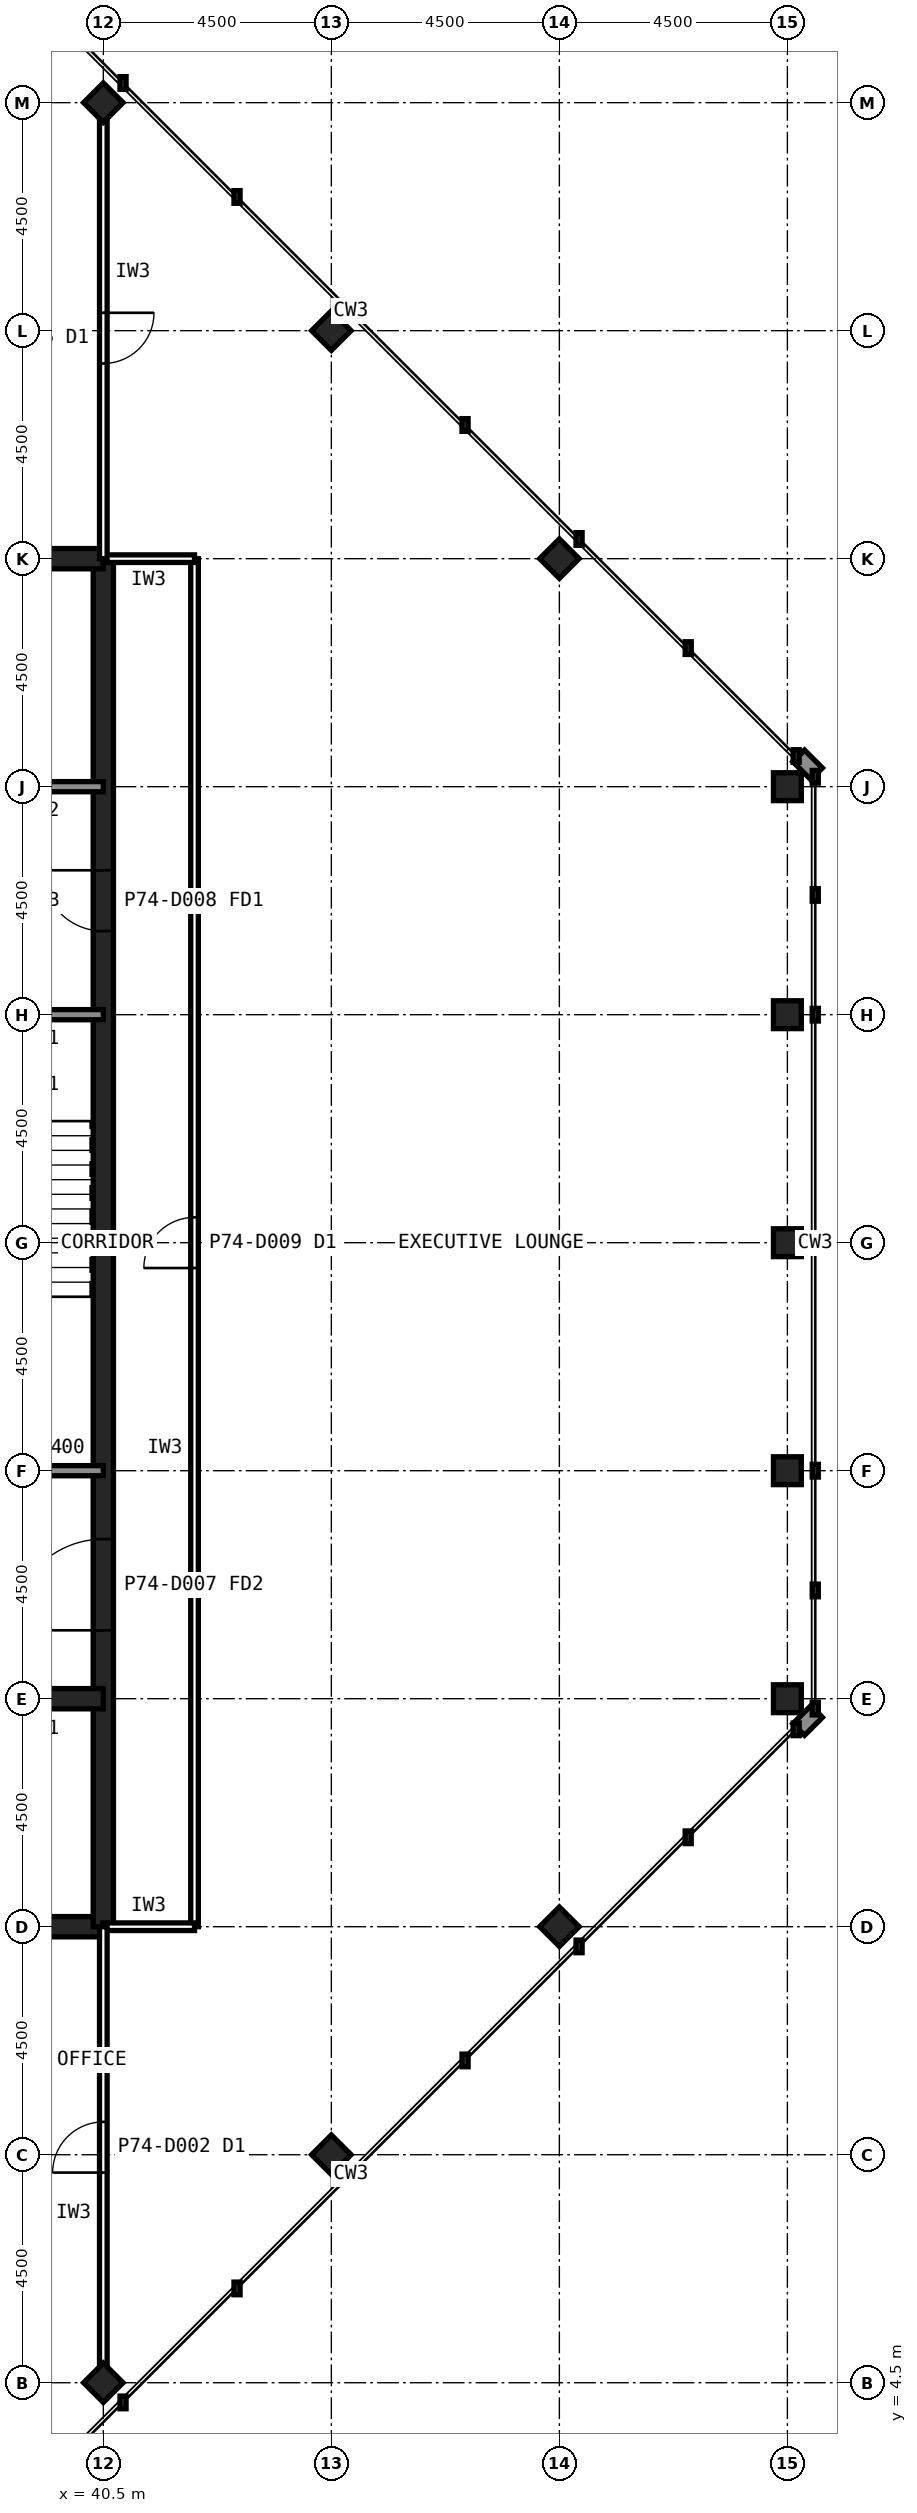
"""IFC4 building model, lengths in metres.
Left out: names, types, materials, properties, quantities, classifications, styles, units other than length and angle.
Written with IfcOpenShell. Run it as: python <this file> out.ifc"""

import sys

from ifc_helpers import new_model, si_unit, direction, frame, frame_2d, origin, origin_2d, place, context, subcontext, project, spatial, rectangle, hollow_rectangle, extrude, element, fill, save


model = new_model("IFC4")
c1 = context("Model", 3, precision=1e-05, world=origin(), true_north=direction((0.0, 1.0)))
c2 = subcontext(c1, "Body", "Model", "MODEL_VIEW")
j1 = project(units=[si_unit("LENGTHUNIT", "METRE"), si_unit("PLANEANGLEUNIT", "RADIAN")], contexts=[c1])
p1 = place(None, origin())
s1 = spatial("IfcSite", under=j1, at=p1, CompositionType="ELEMENT")
p2 = place(p1, origin())
s2 = spatial("IfcBuilding", under=s1, at=p2, CompositionType="ELEMENT")
p3 = place(p2, frame((0.0, 0.0, 310.6)))
s3 = spatial("IfcBuildingStorey", under=s2, at=p3, CompositionType="ELEMENT", Elevation=310.6)
for number, where, z_axis, x_axis in (
    (1, (54.0, 18.0, 0.0), (0.0, 0.0, 1.0), (1.0, 0.0, 0.0)),
    (2, (54.0, 22.5, 0.0), (0.0, 0.0, 1.0), (1.0, 0.0, 0.0)),
    (3, (54.0, 27.0, 0.0), (0.0, 0.0, 1.0), (1.0, 0.0, 0.0)),
    (4, (54.0, 31.5, 0.0), (0.0, 0.0, 1.0), (1.0, 0.0, 0.0)),
    (5, (54.0, 36.0, 0.0), (0.0, 0.0, 1.0), (1.0, 0.0, 0.0)),
    (6, (40.5, 4.5, 0.0), (0.0, 0.0, 1.0), (0.707, 0.707, 0.0)),
    (7, (45.0, 9.0, 0.0), (0.0, 0.0, 1.0), (0.707, 0.707, 0.0)),
    (8, (49.5, 13.5, 0.0), (0.0, 0.0, 1.0), (0.707, 0.707, 0.0)),
    (9, (49.5, 40.5, 0.0), (0.0, 0.0, 1.0), (0.707, 0.707, 0.0)),
    (10, (45.0, 45.0, 0.0), (0.0, 0.0, 1.0), (0.707, 0.707, 0.0)),
    (11, (40.5, 49.5, 0.0), (0.0, 0.0, 1.0), (0.707, 0.707, 0.0)),
):
    element("IfcColumn", number, at=place(p3, frame(where, z_axis=z_axis, x_axis=x_axis)), inside=s3, PredefinedType="COLUMN", context=c2, shape_type="SweptSolid", body=[
        extrude(hollow_rectangle(XDim=0.55, YDim=0.55, WallThickness=0.025, at=origin_2d()), origin(), (0.0, 0.0, 1.0), 4.5),
    ])
p4 = place(p3, frame((13.5, 13.5, 0.0), z_axis=(0.0, 0.0, 1.0), x_axis=(1.0, 0.0, 0.0)))
e12 = element("IfcWall", 12, at=p4, inside=s3, PredefinedType="SHEAR", context=c2, shape_type="SweptSolid", body=[
    extrude(rectangle(XDim=27.0, YDim=0.4, at=frame_2d((13.5, 0.0))), origin(), (0.0, 0.0, 1.0), 4.5),
])
p5 = place(p3, frame((40.5, 13.5, 0.0), z_axis=(0.0, 0.0, 1.0), x_axis=(0.0, 1.0, 0.0)))
e13 = element("IfcWall", 13, at=p5, inside=s3, PredefinedType="SHEAR", context=c2, shape_type="SweptSolid", body=[
    extrude(rectangle(XDim=27.0, YDim=0.4, at=frame_2d((13.5, 0.0))), origin(), (0.0, 0.0, 1.0), 4.5),
])
p6 = place(p5, frame((5.85, 0.0, 0.0)))
e14 = element("IfcOpeningElement", 14, at=p6, cuts=e13, PredefinedType="OPENING", context=c2, shape_type="SweptSolid", body=[
    extrude(rectangle(XDim=1.8, YDim=2.1, at=frame_2d((0.9, 1.05))), frame((0.0, 0.21, 0.0), z_axis=(0.0, -1.0, 0.0), x_axis=(1.0, 0.0, 0.0)), (0.0, 0.0, 1.0), 0.42),
])
p7 = place(p5, frame((19.65, 0.0, 0.0)))
e15 = element("IfcOpeningElement", 15, at=p7, cuts=e13, PredefinedType="OPENING", context=c2, shape_type="SweptSolid", body=[
    extrude(rectangle(XDim=1.2, YDim=2.1, at=frame_2d((0.6, 1.05))), frame((0.0, 0.21, 0.0), z_axis=(0.0, -1.0, 0.0), x_axis=(1.0, 0.0, 0.0)), (0.0, 0.0, 1.0), 0.42),
])
p8 = place(p3, frame((40.5, 40.5, 0.0), z_axis=(0.0, 0.0, 1.0), x_axis=(-1.0, 0.0, 0.0)))
e16 = element("IfcWall", 16, at=p8, inside=s3, PredefinedType="SHEAR", context=c2, shape_type="SweptSolid", body=[
    extrude(rectangle(XDim=27.0, YDim=0.4, at=frame_2d((13.5, 0.0))), origin(), (0.0, 0.0, 1.0), 4.5),
])
p9 = place(p3, frame((13.5, 18.0, 0.0), z_axis=(0.0, 0.0, 1.0), x_axis=(1.0, 0.0, 0.0)))
e17 = element("IfcWall", 17, at=p9, inside=s3, PredefinedType="SHEAR", context=c2, shape_type="SweptSolid", body=[
    extrude(rectangle(XDim=27.0, YDim=0.4, at=frame_2d((13.5, 0.0))), origin(), (0.0, 0.0, 1.0), 4.5),
])
p10 = place(p9, frame((24.3, 0.0, 0.0)))
e18 = element("IfcOpeningElement", 18, at=p10, cuts=e17, PredefinedType="OPENING", context=c2, shape_type="SweptSolid", body=[
    extrude(rectangle(XDim=0.9, YDim=2.1, at=frame_2d((0.45, 1.05))), frame((0.0, 0.21, 0.0), z_axis=(0.0, -1.0, 0.0), x_axis=(1.0, 0.0, 0.0)), (0.0, 0.0, 1.0), 0.42),
])
p11 = place(p9, frame((5.45, 0.0, 0.0)))
e19 = element("IfcOpeningElement", 19, at=p11, cuts=e17, PredefinedType="OPENING", context=c2, shape_type="SweptSolid", body=[
    extrude(rectangle(XDim=1.1, YDim=2.1, at=frame_2d((0.55, 1.05))), frame((0.0, 0.21, 0.0), z_axis=(0.0, -1.0, 0.0), x_axis=(1.0, 0.0, 0.0)), (0.0, 0.0, 1.0), 0.42),
])
p12 = place(p9, frame((8.45, 0.0, 0.0)))
e20 = element("IfcOpeningElement", 20, at=p12, cuts=e17, PredefinedType="OPENING", context=c2, shape_type="SweptSolid", body=[
    extrude(rectangle(XDim=1.1, YDim=2.1, at=frame_2d((0.55, 1.05))), frame((0.0, 0.21, 0.0), z_axis=(0.0, -1.0, 0.0), x_axis=(1.0, 0.0, 0.0)), (0.0, 0.0, 1.0), 0.42),
])
p13 = place(p9, frame((11.45, 0.0, 0.0)))
e21 = element("IfcOpeningElement", 21, at=p13, cuts=e17, PredefinedType="OPENING", context=c2, shape_type="SweptSolid", body=[
    extrude(rectangle(XDim=1.1, YDim=2.1, at=frame_2d((0.55, 1.05))), frame((0.0, 0.21, 0.0), z_axis=(0.0, -1.0, 0.0), x_axis=(1.0, 0.0, 0.0)), (0.0, 0.0, 1.0), 0.42),
])
p14 = place(p9, frame((14.45, 0.0, 0.0)))
e22 = element("IfcOpeningElement", 22, at=p14, cuts=e17, PredefinedType="OPENING", context=c2, shape_type="SweptSolid", body=[
    extrude(rectangle(XDim=1.1, YDim=2.1, at=frame_2d((0.55, 1.05))), frame((0.0, 0.21, 0.0), z_axis=(0.0, -1.0, 0.0), x_axis=(1.0, 0.0, 0.0)), (0.0, 0.0, 1.0), 0.42),
])
p15 = place(p9, frame((17.45, 0.0, 0.0)))
e23 = element("IfcOpeningElement", 23, at=p15, cuts=e17, PredefinedType="OPENING", context=c2, shape_type="SweptSolid", body=[
    extrude(rectangle(XDim=1.1, YDim=2.1, at=frame_2d((0.55, 1.05))), frame((0.0, 0.21, 0.0), z_axis=(0.0, -1.0, 0.0), x_axis=(1.0, 0.0, 0.0)), (0.0, 0.0, 1.0), 0.42),
])
p16 = place(p9, frame((20.45, 0.0, 0.0)))
e24 = element("IfcOpeningElement", 24, at=p16, cuts=e17, PredefinedType="OPENING", context=c2, shape_type="SweptSolid", body=[
    extrude(rectangle(XDim=1.1, YDim=2.1, at=frame_2d((0.55, 1.05))), frame((0.0, 0.21, 0.0), z_axis=(0.0, -1.0, 0.0), x_axis=(1.0, 0.0, 0.0)), (0.0, 0.0, 1.0), 0.42),
])
p17 = place(p9, frame((1.6, 0.0, 0.0)))
e25 = element("IfcOpeningElement", 25, at=p17, cuts=e17, PredefinedType="OPENING", context=c2, shape_type="SweptSolid", body=[
    extrude(rectangle(XDim=1.3, YDim=2.2, at=frame_2d((0.65, 1.1))), frame((0.0, 0.21, 0.0), z_axis=(0.0, -1.0, 0.0), x_axis=(1.0, 0.0, 0.0)), (0.0, 0.0, 1.0), 0.42),
])
p18 = place(p3, frame((13.5, 36.0, 0.0), z_axis=(0.0, 0.0, 1.0), x_axis=(1.0, 0.0, 0.0)))
e26 = element("IfcWall", 26, at=p18, inside=s3, PredefinedType="SOLIDWALL", context=c2, shape_type="SweptSolid", body=[
    extrude(rectangle(XDim=27.0, YDim=0.2, at=frame_2d((13.5, 0.0))), origin(), (0.0, 0.0, 1.0), 4.32),
])
p19 = place(p18, frame((1.8, 0.0, 0.0)))
e27 = element("IfcOpeningElement", 27, at=p19, cuts=e26, PredefinedType="OPENING", context=c2, shape_type="SweptSolid", body=[
    extrude(rectangle(XDim=0.9, YDim=2.1, at=frame_2d((0.45, 1.05))), frame((0.0, 0.11, 0.0), z_axis=(0.0, -1.0, 0.0), x_axis=(1.0, 0.0, 0.0)), (0.0, 0.0, 1.0), 0.22),
])
p20 = place(p18, frame((5.55, 0.0, 0.0)))
e28 = element("IfcOpeningElement", 28, at=p20, cuts=e26, PredefinedType="OPENING", context=c2, shape_type="SweptSolid", body=[
    extrude(rectangle(XDim=0.9, YDim=2.1, at=frame_2d((0.45, 1.05))), frame((0.0, 0.11, 0.0), z_axis=(0.0, -1.0, 0.0), x_axis=(1.0, 0.0, 0.0)), (0.0, 0.0, 1.0), 0.22),
])
p21 = place(p18, frame((11.55, 0.0, 0.0)))
e29 = element("IfcOpeningElement", 29, at=p21, cuts=e26, PredefinedType="OPENING", context=c2, shape_type="SweptSolid", body=[
    extrude(rectangle(XDim=0.9, YDim=2.1, at=frame_2d((0.45, 1.05))), frame((0.0, 0.11, 0.0), z_axis=(0.0, -1.0, 0.0), x_axis=(1.0, 0.0, 0.0)), (0.0, 0.0, 1.0), 0.22),
])
p22 = place(p18, frame((14.55, 0.0, 0.0)))
e30 = element("IfcOpeningElement", 30, at=p22, cuts=e26, PredefinedType="OPENING", context=c2, shape_type="SweptSolid", body=[
    extrude(rectangle(XDim=0.9, YDim=2.1, at=frame_2d((0.45, 1.05))), frame((0.0, 0.11, 0.0), z_axis=(0.0, -1.0, 0.0), x_axis=(1.0, 0.0, 0.0)), (0.0, 0.0, 1.0), 0.22),
])
p23 = place(p18, frame((20.55, 0.0, 0.0)))
e31 = element("IfcOpeningElement", 31, at=p23, cuts=e26, PredefinedType="OPENING", context=c2, shape_type="SweptSolid", body=[
    extrude(rectangle(XDim=0.9, YDim=2.1, at=frame_2d((0.45, 1.05))), frame((0.0, 0.11, 0.0), z_axis=(0.0, -1.0, 0.0), x_axis=(1.0, 0.0, 0.0)), (0.0, 0.0, 1.0), 0.22),
])
p24 = place(p18, frame((24.1, 0.0, 0.0)))
e32 = element("IfcOpeningElement", 32, at=p24, cuts=e26, PredefinedType="OPENING", context=c2, shape_type="SweptSolid", body=[
    extrude(rectangle(XDim=1.3, YDim=2.2, at=frame_2d((0.65, 1.1))), frame((0.0, 0.11, 0.0), z_axis=(0.0, -1.0, 0.0), x_axis=(1.0, 0.0, 0.0)), (0.0, 0.0, 1.0), 0.22),
])
p25 = place(p3, frame((13.5, 22.5, 0.0), z_axis=(0.0, 0.0, 1.0), x_axis=(1.0, 0.0, 0.0)))
e33 = element("IfcWall", 33, at=p25, inside=s3, PredefinedType="SOLIDWALL", context=c2, shape_type="SweptSolid", body=[
    extrude(rectangle(XDim=27.0, YDim=0.2, at=frame_2d((13.5, 0.0))), origin(), (0.0, 0.0, 1.0), 4.32),
])
p26 = place(p25, frame((1.65, 0.0, 0.0)))
e34 = element("IfcOpeningElement", 34, at=p26, cuts=e33, PredefinedType="OPENING", context=c2, shape_type="SweptSolid", body=[
    extrude(rectangle(XDim=1.2, YDim=2.1, at=frame_2d((0.6, 1.05))), frame((0.0, 0.11, 0.0), z_axis=(0.0, -1.0, 0.0), x_axis=(1.0, 0.0, 0.0)), (0.0, 0.0, 1.0), 0.22),
])
p27 = place(p25, frame((6.025, 0.0, 0.0)))
e35 = element("IfcOpeningElement", 35, at=p27, cuts=e33, PredefinedType="OPENING", context=c2, shape_type="SweptSolid", body=[
    extrude(rectangle(XDim=1.0, YDim=2.1, at=frame_2d((0.5, 1.05))), frame((0.0, 0.11, 0.0), z_axis=(0.0, -1.0, 0.0), x_axis=(1.0, 0.0, 0.0)), (0.0, 0.0, 1.0), 0.22),
])
p28 = place(p25, frame((10.525, 0.0, 0.0)))
e36 = element("IfcOpeningElement", 36, at=p28, cuts=e33, PredefinedType="OPENING", context=c2, shape_type="SweptSolid", body=[
    extrude(rectangle(XDim=1.0, YDim=2.1, at=frame_2d((0.5, 1.05))), frame((0.0, 0.11, 0.0), z_axis=(0.0, -1.0, 0.0), x_axis=(1.0, 0.0, 0.0)), (0.0, 0.0, 1.0), 0.22),
])
p29 = place(p25, frame((19.75, 0.0, 0.0)))
e37 = element("IfcOpeningElement", 37, at=p29, cuts=e33, PredefinedType="OPENING", context=c2, shape_type="SweptSolid", body=[
    extrude(rectangle(XDim=1.0, YDim=2.1, at=frame_2d((0.5, 1.05))), frame((0.0, 0.11, 0.0), z_axis=(0.0, -1.0, 0.0), x_axis=(1.0, 0.0, 0.0)), (0.0, 0.0, 1.0), 0.22),
])
p30 = place(p25, frame((15.05, 0.0, 0.0)))
e38 = element("IfcOpeningElement", 38, at=p30, cuts=e33, PredefinedType="OPENING", context=c2, shape_type="SweptSolid", body=[
    extrude(rectangle(XDim=1.4, YDim=2.4, at=frame_2d((0.7, 1.2))), frame((0.0, 0.11, 0.0), z_axis=(0.0, -1.0, 0.0), x_axis=(1.0, 0.0, 0.0)), (0.0, 0.0, 1.0), 0.22),
])
p31 = place(p3, frame((13.5, 31.5, 0.0), z_axis=(0.0, 0.0, 1.0), x_axis=(1.0, 0.0, 0.0)))
e39 = element("IfcWall", 39, at=p31, inside=s3, PredefinedType="SOLIDWALL", context=c2, shape_type="SweptSolid", body=[
    extrude(rectangle(XDim=27.0, YDim=0.2, at=frame_2d((13.5, 0.0))), origin(), (0.0, 0.0, 1.0), 4.32),
])
p32 = place(p31, frame((24.15, 0.0, 0.0)))
e40 = element("IfcOpeningElement", 40, at=p32, cuts=e39, PredefinedType="OPENING", context=c2, shape_type="SweptSolid", body=[
    extrude(rectangle(XDim=1.2, YDim=2.1, at=frame_2d((0.6, 1.05))), frame((0.0, 0.11, 0.0), z_axis=(0.0, -1.0, 0.0), x_axis=(1.0, 0.0, 0.0)), (0.0, 0.0, 1.0), 0.22),
])
p33 = place(p31, frame((15.3, 0.0, 0.0)))
e41 = element("IfcOpeningElement", 41, at=p33, cuts=e39, PredefinedType="OPENING", context=c2, shape_type="SweptSolid", body=[
    extrude(rectangle(XDim=0.9, YDim=2.1, at=frame_2d((0.45, 1.05))), frame((0.0, 0.11, 0.0), z_axis=(0.0, -1.0, 0.0), x_axis=(1.0, 0.0, 0.0)), (0.0, 0.0, 1.0), 0.22),
])
p34 = place(p31, frame((19.8, 0.0, 0.0)))
e42 = element("IfcOpeningElement", 42, at=p34, cuts=e39, PredefinedType="OPENING", context=c2, shape_type="SweptSolid", body=[
    extrude(rectangle(XDim=0.9, YDim=2.1, at=frame_2d((0.45, 1.05))), frame((0.0, 0.11, 0.0), z_axis=(0.0, -1.0, 0.0), x_axis=(1.0, 0.0, 0.0)), (0.0, 0.0, 1.0), 0.22),
])
p35 = place(p3, frame((42.3, 13.5, 0.0), z_axis=(0.0, 0.0, 1.0), x_axis=(0.0, 1.0, 0.0)))
e43 = element("IfcWall", 43, at=p35, inside=s3, PredefinedType="PARTITIONING", context=c2, shape_type="SweptSolid", body=[
    extrude(rectangle(XDim=27.0, YDim=0.15, at=frame_2d((13.5, 0.0))), origin(), (0.0, 0.0, 1.0), 4.32),
])
p36 = place(p35, frame((13.0, 0.0, 0.0)))
e44 = element("IfcOpeningElement", 44, at=p36, cuts=e43, PredefinedType="OPENING", context=c2, shape_type="SweptSolid", body=[
    extrude(rectangle(XDim=1.0, YDim=2.1, at=frame_2d((0.5, 1.05))), frame((0.0, 0.085, 0.0), z_axis=(0.0, -1.0, 0.0), x_axis=(1.0, 0.0, 0.0)), (0.0, 0.0, 1.0), 0.17),
])
for number, where, z_axis, x_axis in (
    (45, (40.49, 13.5, 0.0), (0.0, 0.0, 1.0), (1.0, 0.0, 0.0)),
    (46, (42.3, 40.5, 0.0), (0.0, 0.0, 1.0), (-1.0, 0.0, 0.0)),
):
    element("IfcWall", number, at=place(p3, frame(where, z_axis=z_axis, x_axis=x_axis)), inside=s3, PredefinedType="PARTITIONING", context=c2, shape_type="SweptSolid", body=[
        extrude(rectangle(XDim=1.81, YDim=0.15, at=frame_2d((0.905, 0.0))), origin(), (0.0, 0.0, 1.0), 3.393),
    ])
p37 = place(p3, frame((40.5, 49.205, 0.0), z_axis=(0.0, 0.0, 1.0), x_axis=(0.0, -1.0, 0.0)))
e47 = element("IfcWall", 47, at=p37, inside=s3, PredefinedType="PARTITIONING", context=c2, shape_type="SweptSolid", body=[
    extrude(rectangle(XDim=8.705, YDim=0.15, at=frame_2d((4.353, 0.0))), origin(), (0.0, 0.0, 1.0), 3.393),
])
p38 = place(p37, frame((3.853, 0.0, 0.0)))
e48 = element("IfcOpeningElement", 48, at=p38, cuts=e47, PredefinedType="OPENING", context=c2, shape_type="SweptSolid", body=[
    extrude(rectangle(XDim=1.0, YDim=2.1, at=frame_2d((0.5, 1.05))), frame((0.0, 0.085, 0.0), z_axis=(0.0, -1.0, 0.0), x_axis=(1.0, 0.0, 0.0)), (0.0, 0.0, 1.0), 0.17),
])
p39 = place(p3, frame((40.5, 4.795, 0.0), z_axis=(0.0, 0.0, 1.0), x_axis=(0.0, 1.0, 0.0)))
e49 = element("IfcWall", 49, at=p39, inside=s3, PredefinedType="PARTITIONING", context=c2, shape_type="SweptSolid", body=[
    extrude(rectangle(XDim=8.705, YDim=0.15, at=frame_2d((4.353, 0.0))), origin(), (0.0, 0.0, 1.0), 3.393),
])
p40 = place(p39, frame((3.853, 0.0, 0.0)))
e50 = element("IfcOpeningElement", 50, at=p40, cuts=e49, PredefinedType="OPENING", context=c2, shape_type="SweptSolid", body=[
    extrude(rectangle(XDim=1.0, YDim=2.1, at=frame_2d((0.5, 1.05))), frame((0.0, 0.085, 0.0), z_axis=(0.0, -1.0, 0.0), x_axis=(1.0, 0.0, 0.0)), (0.0, 0.0, 1.0), 0.17),
])
p41 = place(p6, origin())
e51 = element("IfcDoor", 51, at=p41, inside=s3, OperationType="SINGLE_SWING_LEFT", PredefinedType="DOOR", context=c2, shape_type="SweptSolid", body=[
    extrude(rectangle(XDim=1.8, YDim=2.1, at=frame_2d((0.9, 1.05))), frame((0.0, 0.025, 0.0), z_axis=(0.0, -1.0, 0.0), x_axis=(1.0, 0.0, 0.0)), (0.0, 0.0, 1.0), 0.05),
])
fill(e14, e51)
p42 = place(p7, origin())
e52 = element("IfcDoor", 52, at=p42, inside=s3, OperationType="SINGLE_SWING_RIGHT", PredefinedType="DOOR", context=c2, shape_type="SweptSolid", body=[
    extrude(rectangle(XDim=1.2, YDim=2.1, at=frame_2d((0.6, 1.05))), frame((0.0, 0.025, 0.0), z_axis=(0.0, -1.0, 0.0), x_axis=(1.0, 0.0, 0.0)), (0.0, 0.0, 1.0), 0.05),
])
fill(e15, e52)
p43 = place(p36, origin())
e53 = element("IfcDoor", 53, at=p43, inside=s3, OperationType="SINGLE_SWING_LEFT", PredefinedType="DOOR", context=c2, shape_type="SweptSolid", body=[
    extrude(rectangle(XDim=1.0, YDim=2.1, at=frame_2d((0.5, 1.05))), frame((0.0, 0.025, 0.0), z_axis=(0.0, -1.0, 0.0), x_axis=(1.0, 0.0, 0.0)), (0.0, 0.0, 1.0), 0.05),
])
fill(e44, e53)
p44 = place(p38, origin())
e54 = element("IfcDoor", 54, at=p44, inside=s3, OperationType="SINGLE_SWING_LEFT", PredefinedType="DOOR", context=c2, shape_type="SweptSolid", body=[
    extrude(rectangle(XDim=1.0, YDim=2.1, at=frame_2d((0.5, 1.05))), frame((0.0, 0.025, 0.0), z_axis=(0.0, -1.0, 0.0), x_axis=(1.0, 0.0, 0.0)), (0.0, 0.0, 1.0), 0.05),
])
fill(e48, e54)
p45 = place(p40, origin())
e55 = element("IfcDoor", 55, at=p45, inside=s3, OperationType="SINGLE_SWING_LEFT", PredefinedType="DOOR", context=c2, shape_type="SweptSolid", body=[
    extrude(rectangle(XDim=1.0, YDim=2.1, at=frame_2d((0.5, 1.05))), frame((0.0, 0.025, 0.0), z_axis=(0.0, -1.0, 0.0), x_axis=(1.0, 0.0, 0.0)), (0.0, 0.0, 1.0), 0.05),
])
fill(e50, e55)
save(model, sys.argv[1])
